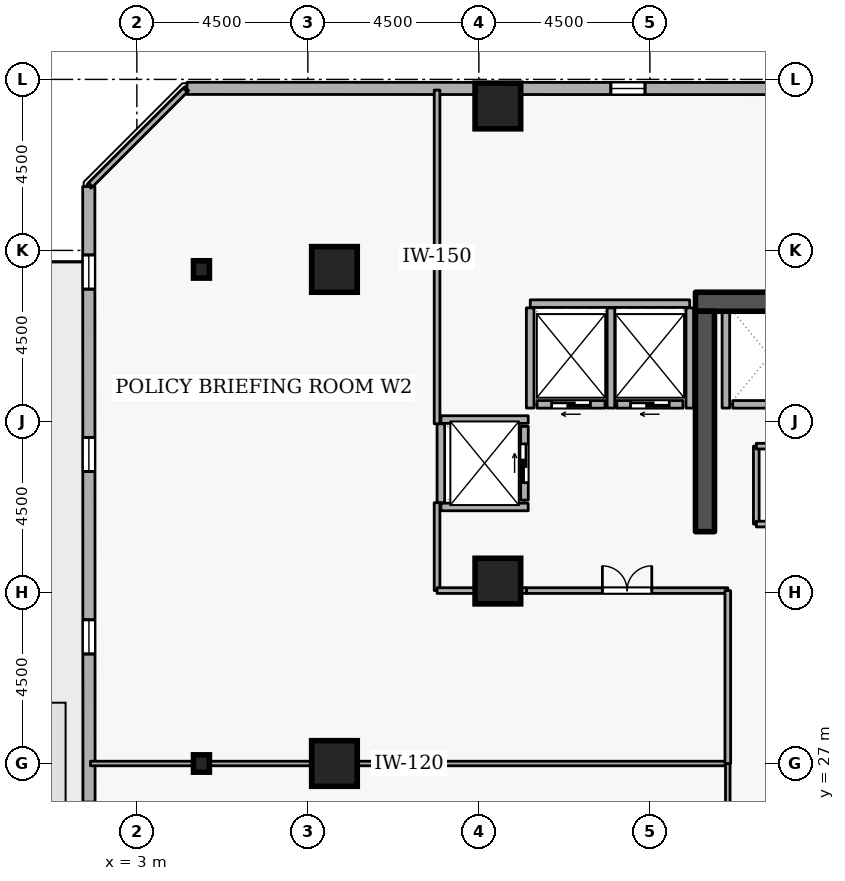
"""IFC4 building model, lengths in metres.
Left out: names, types, materials, properties, quantities, classifications, styles, units other than length and angle.
Written with IfcOpenShell. Run it as: python <this file> out.ifc"""

import sys

from ifc_helpers import new_model, si_unit, direction, frame, frame_2d, origin, origin_2d, place, context, subcontext, project, spatial, rectangle, i_section, extrude, element, fill, save


model = new_model("IFC4")
c1 = context("Model", 3, precision=1e-05, world=origin(), true_north=direction((0.0, 1.0)))
c2 = subcontext(c1, "Body", "Model", "MODEL_VIEW")
j1 = project(units=[si_unit("LENGTHUNIT", "METRE"), si_unit("PLANEANGLEUNIT", "RADIAN")], contexts=[c1])
p1 = place(None, origin())
s1 = spatial("IfcSite", under=j1, at=p1, CompositionType="ELEMENT")
p2 = place(p1, origin())
s2 = spatial("IfcBuilding", under=s1, at=p2, CompositionType="ELEMENT")
p3 = place(p2, frame((0.0, 0.0, 123.3)))
s3 = spatial("IfcBuildingStorey", under=s2, at=p3, CompositionType="ELEMENT", Elevation=123.3)
p4 = place(p3, frame((17.7, 39.15, 0.0), z_axis=(0.0, 0.0, 1.0), x_axis=(1.0, 0.0, 0.0)))
e1 = element("IfcWall", 1, at=p4, inside=s3, PredefinedType="SHEAR", context=c2, shape_type="SweptSolid", body=[
    extrude(rectangle(XDim=15.6, YDim=0.5, at=frame_2d((7.8, 0.0))), origin(), (0.0, 0.0, 1.0), 3.6),
])
p5 = place(p3, frame((17.95, 33.1, 0.0), z_axis=(0.0, 0.0, 1.0), x_axis=(0.0, 1.0, 0.0)))
e2 = element("IfcWall", 2, at=p5, inside=s3, PredefinedType="SHEAR", context=c2, shape_type="SweptSolid", body=[
    extrude(rectangle(XDim=5.8, YDim=0.5, at=frame_2d((2.9, 0.0))), origin(), (0.0, 0.0, 1.0), 3.6),
])
for number, where, z_axis, x_axis in (
    (3, (12.5, 44.3, 0.0), (0.0, 0.0, 1.0), (1.0, 0.0, 0.0)),
    (4, (8.2, 27.0, 0.0), (0.0, 0.0, 1.0), (1.0, 0.0, 0.0)),
    (5, (8.2, 40.0, 0.0), (0.0, 0.0, 1.0), (1.0, 0.0, 0.0)),
    (6, (12.5, 31.8, 0.0), (0.0, 0.0, 1.0), (1.0, 0.0, 0.0)),
):
    element("IfcColumn", number, at=place(p3, frame(where, z_axis=z_axis, x_axis=x_axis)), inside=s3, PredefinedType="COLUMN", context=c2, shape_type="SweptSolid", body=[
        extrude(rectangle(XDim=1.2, YDim=1.2, at=origin_2d()), origin(), (0.0, 0.0, 1.0), 3.6),
    ])
for number, where, z_axis, x_axis in (
    (7, (4.7, 27.0, 0.0), (0.0, 0.0, 1.0), (1.0, 0.0, 0.0)),
    (8, (4.7, 40.0, 0.0), (0.0, 0.0, 1.0), (1.0, 0.0, 0.0)),
):
    element("IfcColumn", number, at=place(p3, frame(where, z_axis=z_axis, x_axis=x_axis)), inside=s3, PredefinedType="COLUMN", context=c2, shape_type="SweptSolid", body=[
        extrude(i_section(OverallWidth=0.418, OverallDepth=0.456, WebThickness=0.042, FlangeThickness=0.067, FilletRadius=0.015, at=origin_2d()), origin(), (0.0, 0.0, 1.0), 3.6),
    ])
p6 = place(p3, frame((37.372, 44.754, 0.0), z_axis=(0.0, 0.0, 1.0), x_axis=(-0.999999944762, 0.000332378036, 0.0)))
e9 = element("IfcWall", 9, at=p6, inside=s3, PredefinedType="STANDARD", context=c2, shape_type="SweptSolid", body=[
    extrude(rectangle(XDim=33.054, YDim=0.32, at=frame_2d((16.527, 0.0))), origin(), (0.0, 0.0, 1.0), 2.7),
])
p7 = place(p6, frame((1.8, 0.0, 0.72)))
e10 = element("IfcOpeningElement", 10, at=p7, cuts=e9, PredefinedType="OPENING", context=c2, shape_type="SweptSolid", body=[
    extrude(rectangle(XDim=0.9, YDim=1.75, at=frame_2d((0.45, 0.875))), frame((0.0, 0.17, 0.0), z_axis=(0.0, -1.0, 0.0), x_axis=(1.0, 0.0, 0.0)), (0.0, 0.0, 1.0), 0.34),
])
p8 = place(p6, frame((6.6, 0.0, 0.72)))
e11 = element("IfcOpeningElement", 11, at=p8, cuts=e9, PredefinedType="OPENING", context=c2, shape_type="SweptSolid", body=[
    extrude(rectangle(XDim=0.9, YDim=1.75, at=frame_2d((0.45, 0.875))), frame((0.0, 0.17, 0.0), z_axis=(0.0, -1.0, 0.0), x_axis=(1.0, 0.0, 0.0)), (0.0, 0.0, 1.0), 0.34),
])
p9 = place(p6, frame((16.2, 0.0, 0.72)))
e12 = element("IfcOpeningElement", 12, at=p9, cuts=e9, PredefinedType="OPENING", context=c2, shape_type="SweptSolid", body=[
    extrude(rectangle(XDim=0.9, YDim=1.75, at=frame_2d((0.45, 0.875))), frame((0.0, 0.17, 0.0), z_axis=(0.0, -1.0, 0.0), x_axis=(1.0, 0.0, 0.0)), (0.0, 0.0, 1.0), 0.34),
])
p10 = place(p6, frame((21.0, 0.0, 0.72)))
e13 = element("IfcOpeningElement", 13, at=p10, cuts=e9, PredefinedType="OPENING", context=c2, shape_type="SweptSolid", body=[
    extrude(rectangle(XDim=0.9, YDim=1.75, at=frame_2d((0.45, 0.875))), frame((0.0, 0.17, 0.0), z_axis=(0.0, -1.0, 0.0), x_axis=(1.0, 0.0, 0.0)), (0.0, 0.0, 1.0), 0.34),
])
p11 = place(p3, frame((1.735, 42.181, 0.0), z_axis=(0.0, 0.0, 1.0), x_axis=(0.000332378036, -0.999999944762, 0.0)))
e14 = element("IfcWall", 14, at=p11, inside=s3, PredefinedType="STANDARD", context=c2, shape_type="SweptSolid", body=[
    extrude(rectangle(XDim=33.054, YDim=0.32, at=frame_2d((16.527, 0.0))), origin(), (0.0, 0.0, 1.0), 2.7),
])
p12 = place(p11, frame((18.327, 0.0, 0.0)))
e15 = element("IfcOpeningElement", 15, at=p12, cuts=e14, PredefinedType="OPENING", context=c2, shape_type="SweptSolid", body=[
    extrude(rectangle(XDim=1.0, YDim=2.08, at=frame_2d((0.5, 1.04))), frame((0.0, 0.17, 0.0), z_axis=(0.0, -1.0, 0.0), x_axis=(1.0, 0.0, 0.0)), (0.0, 0.0, 1.0), 0.34),
])
p13 = place(p11, frame((1.8, 0.0, 0.72)))
e16 = element("IfcOpeningElement", 16, at=p13, cuts=e14, PredefinedType="OPENING", context=c2, shape_type="SweptSolid", body=[
    extrude(rectangle(XDim=0.9, YDim=1.75, at=frame_2d((0.45, 0.875))), frame((0.0, 0.17, 0.0), z_axis=(0.0, -1.0, 0.0), x_axis=(1.0, 0.0, 0.0)), (0.0, 0.0, 1.0), 0.34),
])
p14 = place(p11, frame((6.6, 0.0, 0.72)))
e17 = element("IfcOpeningElement", 17, at=p14, cuts=e14, PredefinedType="OPENING", context=c2, shape_type="SweptSolid", body=[
    extrude(rectangle(XDim=0.9, YDim=1.75, at=frame_2d((0.45, 0.875))), frame((0.0, 0.17, 0.0), z_axis=(0.0, -1.0, 0.0), x_axis=(1.0, 0.0, 0.0)), (0.0, 0.0, 1.0), 0.34),
])
p15 = place(p11, frame((11.4, 0.0, 0.72)))
e18 = element("IfcOpeningElement", 18, at=p15, cuts=e14, PredefinedType="OPENING", context=c2, shape_type="SweptSolid", body=[
    extrude(rectangle(XDim=0.9, YDim=1.75, at=frame_2d((0.45, 0.875))), frame((0.0, 0.17, 0.0), z_axis=(0.0, -1.0, 0.0), x_axis=(1.0, 0.0, 0.0)), (0.0, 0.0, 1.0), 0.34),
])
p16 = place(p11, frame((16.2, 0.0, 0.72)))
e19 = element("IfcOpeningElement", 19, at=p16, cuts=e14, PredefinedType="OPENING", context=c2, shape_type="SweptSolid", body=[
    extrude(rectangle(XDim=0.9, YDim=1.75, at=frame_2d((0.45, 0.875))), frame((0.0, 0.17, 0.0), z_axis=(0.0, -1.0, 0.0), x_axis=(1.0, 0.0, 0.0)), (0.0, 0.0, 1.0), 0.34),
])
p17 = place(p11, frame((21.0, 0.0, 0.72)))
e20 = element("IfcOpeningElement", 20, at=p17, cuts=e14, PredefinedType="OPENING", context=c2, shape_type="SweptSolid", body=[
    extrude(rectangle(XDim=0.9, YDim=1.75, at=frame_2d((0.45, 0.875))), frame((0.0, 0.17, 0.0), z_axis=(0.0, -1.0, 0.0), x_axis=(1.0, 0.0, 0.0)), (0.0, 0.0, 1.0), 0.34),
])
p18 = place(p11, frame((25.8, 0.0, 0.72)))
e21 = element("IfcOpeningElement", 21, at=p18, cuts=e14, PredefinedType="OPENING", context=c2, shape_type="SweptSolid", body=[
    extrude(rectangle(XDim=0.9, YDim=1.75, at=frame_2d((0.45, 0.875))), frame((0.0, 0.17, 0.0), z_axis=(0.0, -1.0, 0.0), x_axis=(1.0, 0.0, 0.0)), (0.0, 0.0, 1.0), 0.34),
])
p19 = place(p3, frame((20.62, 36.45, 0.0), z_axis=(0.0, 0.0, 1.0), x_axis=(-1.0, 0.0, 0.0)))
e22 = element("IfcWall", 22, at=p19, inside=s3, PredefinedType="STANDARD", context=c2, shape_type="SweptSolid", body=[
    extrude(rectangle(XDim=1.94, YDim=0.2, at=frame_2d((0.97, 0.0))), origin(), (0.0, 0.0, 1.0), 3.34),
])
p20 = place(p3, frame((17.37, 36.45, 0.0), z_axis=(0.0, 0.0, 1.0), x_axis=(-1.0, 0.0, 0.0)))
e23 = element("IfcWall", 23, at=p20, inside=s3, PredefinedType="STANDARD", context=c2, shape_type="SweptSolid", body=[
    extrude(rectangle(XDim=1.74, YDim=0.2, at=frame_2d((0.87, 0.0))), origin(), (0.0, 0.0, 1.0), 3.34),
])
p21 = place(p20, frame((0.36, 0.0, 0.0)))
e24 = element("IfcOpeningElement", 24, at=p21, cuts=e23, PredefinedType="OPENING", context=c2, shape_type="SweptSolid", body=[
    extrude(rectangle(XDim=1.02, YDim=2.06, at=frame_2d((0.51, 1.03))), frame((0.0, 0.11, 0.0), z_axis=(0.0, -1.0, 0.0), x_axis=(1.0, 0.0, 0.0)), (0.0, 0.0, 1.0), 0.22),
])
p22 = place(p3, frame((15.32, 36.45, 0.0), z_axis=(0.0, 0.0, 1.0), x_axis=(-1.0, 0.0, 0.0)))
e25 = element("IfcWall", 25, at=p22, inside=s3, PredefinedType="STANDARD", context=c2, shape_type="SweptSolid", body=[
    extrude(rectangle(XDim=1.79, YDim=0.2, at=frame_2d((0.895, 0.0))), origin(), (0.0, 0.0, 1.0), 3.34),
])
p23 = place(p22, frame((0.385, 0.0, 0.0)))
e26 = element("IfcOpeningElement", 26, at=p23, cuts=e25, PredefinedType="OPENING", context=c2, shape_type="SweptSolid", body=[
    extrude(rectangle(XDim=1.02, YDim=2.06, at=frame_2d((0.51, 1.03))), frame((0.0, 0.11, 0.0), z_axis=(0.0, -1.0, 0.0), x_axis=(1.0, 0.0, 0.0)), (0.0, 0.0, 1.0), 0.22),
])
p24 = place(p3, frame((13.2, 33.93, 0.0), z_axis=(0.0, 0.0, 1.0), x_axis=(0.0, 1.0, 0.0)))
e27 = element("IfcWall", 27, at=p24, inside=s3, PredefinedType="STANDARD", context=c2, shape_type="SweptSolid", body=[
    extrude(rectangle(XDim=1.94, YDim=0.2, at=frame_2d((0.97, 0.0))), origin(), (0.0, 0.0, 1.0), 3.34),
])
p25 = place(p24, frame((0.46, 0.0, 0.0)))
e28 = element("IfcOpeningElement", 28, at=p25, cuts=e27, PredefinedType="OPENING", context=c2, shape_type="SweptSolid", body=[
    extrude(rectangle(XDim=1.02, YDim=2.06, at=frame_2d((0.51, 1.03))), frame((0.0, 0.11, 0.0), z_axis=(0.0, -1.0, 0.0), x_axis=(1.0, 0.0, 0.0)), (0.0, 0.0, 1.0), 0.22),
])
p26 = place(p3, frame((18.5, 36.352, 0.0), z_axis=(0.0, 0.0, 1.0), x_axis=(0.0, 1.0, 0.0)))
e29 = element("IfcWall", 29, at=p26, inside=s3, PredefinedType="STANDARD", context=c2, shape_type="SweptSolid", body=[
    extrude(rectangle(XDim=2.536, YDim=0.2, at=frame_2d((1.268, 0.0))), origin(), (0.0, 0.0, 1.0), 3.34),
])
p27 = place(p3, frame((13.352, 39.1, 0.0), z_axis=(0.0, 0.0, 1.0), x_axis=(1.0, 0.0, 0.0)))
e30 = element("IfcWall", 30, at=p27, inside=s3, PredefinedType="STANDARD", context=c2, shape_type="SweptSolid", body=[
    extrude(rectangle(XDim=4.196, YDim=0.2, at=frame_2d((2.098, 0.0))), origin(), (0.0, 0.0, 1.0), 3.34),
])
p28 = place(p3, frame((17.55, 36.352, 0.0), z_axis=(0.0, 0.0, 1.0), x_axis=(0.0, 1.0, 0.0)))
e31 = element("IfcWall", 31, at=p28, inside=s3, PredefinedType="STANDARD", context=c2, shape_type="SweptSolid", body=[
    extrude(rectangle(XDim=2.636, YDim=0.2, at=frame_2d((1.318, 0.0))), origin(), (0.0, 0.0, 1.0), 2.545),
])
for number, where, z_axis, x_axis in (
    (32, (15.475, 36.352, 0.0), (0.0, 0.0, 1.0), (0.0, 1.0, 0.0)),
    (33, (13.35, 36.352, 0.0), (0.0, 0.0, 1.0), (0.0, 1.0, 0.0)),
):
    element("IfcWall", number, at=place(p3, frame(where, z_axis=z_axis, x_axis=x_axis)), inside=s3, PredefinedType="STANDARD", context=c2, shape_type="SweptSolid", body=[
        extrude(rectangle(XDim=2.636, YDim=0.2, at=frame_2d((1.318, 0.0))), origin(), (0.0, 0.0, 1.0), 3.34),
    ])
for number, where, z_axis, x_axis in (
    (34, (11.002, 36.05, 0.0), (0.0, 0.0, 1.0), (1.0, 0.0, 0.0)),
    (35, (11.002, 33.75, 0.0), (0.0, 0.0, 1.0), (1.0, 0.0, 0.0)),
):
    element("IfcWall", number, at=place(p3, frame(where, z_axis=z_axis, x_axis=x_axis)), inside=s3, PredefinedType="STANDARD", context=c2, shape_type="SweptSolid", body=[
        extrude(rectangle(XDim=2.296, YDim=0.2, at=frame_2d((1.148, 0.0))), origin(), (0.0, 0.0, 1.0), 3.34),
    ])
p29 = place(p3, frame((11.0, 33.862, 0.0), z_axis=(0.0, 0.0, 1.0), x_axis=(0.0, 1.0, 0.0)))
e36 = element("IfcWall", 36, at=p29, inside=s3, PredefinedType="STANDARD", context=c2, shape_type="SweptSolid", body=[
    extrude(rectangle(XDim=2.076, YDim=0.2, at=frame_2d((1.038, 0.0))), origin(), (0.0, 0.0, 1.0), 3.34),
])
p30 = place(p3, frame((19.3, 33.3, 0.0), z_axis=(0.0, 0.0, 1.0), x_axis=(0.0, 1.0, 0.0)))
e37 = element("IfcWall", 37, at=p30, inside=s3, PredefinedType="PARTITIONING", context=c2, shape_type="SweptSolid", body=[
    extrude(rectangle(XDim=2.05, YDim=0.15, at=frame_2d((1.025, 0.0))), origin(), (0.0, 0.0, 1.0), 3.34),
])
p31 = place(p3, frame((19.3, 35.35, 0.0), z_axis=(0.0, 0.0, 1.0), x_axis=(1.0, 0.0, 0.0)))
e38 = element("IfcWall", 38, at=p31, inside=s3, PredefinedType="PARTITIONING", context=c2, shape_type="SweptSolid", body=[
    extrude(rectangle(XDim=3.25, YDim=0.15, at=frame_2d((1.625, 0.0))), origin(), (0.0, 0.0, 1.0), 3.34),
])
p32 = place(p3, frame((22.55, 33.3, 0.0), z_axis=(0.0, 0.0, 1.0), x_axis=(-1.0, 0.0, 0.0)))
e39 = element("IfcWall", 39, at=p32, inside=s3, PredefinedType="PARTITIONING", context=c2, shape_type="SweptSolid", body=[
    extrude(rectangle(XDim=3.25, YDim=0.15, at=frame_2d((1.625, 0.0))), origin(), (0.0, 0.0, 1.0), 3.34),
])
p33 = place(p32, frame((1.165, 0.0, 0.0)))
e40 = element("IfcOpeningElement", 40, at=p33, cuts=e39, PredefinedType="OPENING", context=c2, shape_type="SweptSolid", body=[
    extrude(rectangle(XDim=0.92, YDim=2.08, at=frame_2d((0.46, 1.04))), frame((0.0, 0.085, 0.0), z_axis=(0.0, -1.0, 0.0), x_axis=(1.0, 0.0, 0.0)), (0.0, 0.0, 1.0), 0.17),
])
p34 = place(p3, frame((1.78, 27.0, 0.0), z_axis=(0.0, 0.0, 1.0), x_axis=(1.0, 0.0, 0.0)))
e41 = element("IfcWall", 41, at=p34, inside=s3, PredefinedType="PARTITIONING", context=c2, shape_type="SweptSolid", body=[
    extrude(rectangle(XDim=16.77, YDim=0.12, at=frame_2d((8.385, 0.0))), origin(), (0.0, 0.0, 1.0), 2.932),
])
p35 = place(p3, frame((18.55, 27.0, 0.0), z_axis=(0.0, 0.0, 1.0), x_axis=(0.0, -1.0, 0.0)))
e42 = element("IfcWall", 42, at=p35, inside=s3, PredefinedType="PARTITIONING", context=c2, shape_type="SweptSolid", body=[
    extrude(rectangle(XDim=4.55, YDim=0.12, at=frame_2d((2.275, 0.0))), origin(), (0.0, 0.0, 1.0), 3.34),
])
p36 = place(p3, frame((13.25, 31.55, 0.0), z_axis=(0.0, 0.0, 1.0), x_axis=(1.0, 0.0, 0.0)))
e43 = element("IfcWall", 43, at=p36, inside=s3, PredefinedType="PARTITIONING", context=c2, shape_type="SweptSolid", body=[
    extrude(rectangle(XDim=5.3, YDim=0.15, at=frame_2d((2.65, 0.0))), origin(), (0.0, 0.0, 1.0), 3.34),
])
p37 = place(p36, frame((2.0, 0.0, 0.0)))
e44 = element("IfcOpeningElement", 44, at=p37, cuts=e43, PredefinedType="OPENING", context=c2, shape_type="SweptSolid", body=[
    extrude(rectangle(XDim=1.3, YDim=2.12, at=frame_2d((0.65, 1.06))), frame((0.0, 0.085, 0.0), z_axis=(0.0, -1.0, 0.0), x_axis=(1.0, 0.0, 0.0)), (0.0, 0.0, 1.0), 0.17),
])
p38 = place(p3, frame((18.55, 31.55, 0.0), z_axis=(0.0, 0.0, 1.0), x_axis=(0.0, -1.0, 0.0)))
e45 = element("IfcWall", 45, at=p38, inside=s3, PredefinedType="PARTITIONING", context=c2, shape_type="SweptSolid", body=[
    extrude(rectangle(XDim=4.55, YDim=0.15, at=frame_2d((2.275, 0.0))), origin(), (0.0, 0.0, 1.0), 3.34),
])
p39 = place(p3, frame((1.78, 42.225, 0.0), z_axis=(0.0, 0.0, 1.0), x_axis=(0.707106781187, 0.707106781187, 0.0)))
e46 = element("IfcWall", 46, at=p39, inside=s3, PredefinedType="PARTITIONING", context=c2, shape_type="SweptSolid", body=[
    extrude(rectangle(XDim=3.528, YDim=0.15, at=frame_2d((1.764, 0.0))), origin(), (0.0, 0.0, 1.0), 3.34),
])
p40 = place(p3, frame((10.9, 44.72, 0.0), z_axis=(0.0, 0.0, 1.0), x_axis=(0.0, -1.0, 0.0)))
e47 = element("IfcWall", 47, at=p40, inside=s3, PredefinedType="PARTITIONING", context=c2, shape_type="SweptSolid", body=[
    extrude(rectangle(XDim=8.782, YDim=0.15, at=frame_2d((4.391, 0.0))), origin(), (0.0, 0.0, 1.0), 3.34),
])
p41 = place(p3, frame((10.9, 33.862, 0.0), z_axis=(0.0, 0.0, 1.0), x_axis=(0.0, -1.0, 0.0)))
e48 = element("IfcWall", 48, at=p41, inside=s3, PredefinedType="PARTITIONING", context=c2, shape_type="SweptSolid", body=[
    extrude(rectangle(XDim=2.312, YDim=0.15, at=frame_2d((1.156, 0.0))), origin(), (0.0, 0.0, 1.0), 3.34),
])
p42 = place(p3, frame((10.9, 31.55, 0.0), z_axis=(0.0, 0.0, 1.0), x_axis=(1.0, 0.0, 0.0)))
e49 = element("IfcWall", 49, at=p42, inside=s3, PredefinedType="PARTITIONING", context=c2, shape_type="SweptSolid", body=[
    extrude(rectangle(XDim=2.35, YDim=0.15, at=frame_2d((1.175, 0.0))), origin(), (0.0, 0.0, 1.0), 3.34),
])
p43 = place(p10, origin())
e50 = element("IfcWindow", 50, at=p43, inside=s3, PartitioningType="SINGLE_PANEL", PredefinedType="WINDOW", context=c2, shape_type="SweptSolid", body=[
    extrude(rectangle(XDim=0.9, YDim=1.75, at=frame_2d((0.45, 0.875))), frame((0.0, 0.03, 0.0), z_axis=(0.0, -1.0, 0.0), x_axis=(1.0, 0.0, 0.0)), (0.0, 0.0, 1.0), 0.06),
])
fill(e13, e50)
p44 = place(p13, origin())
e51 = element("IfcWindow", 51, at=p44, inside=s3, PartitioningType="SINGLE_PANEL", PredefinedType="WINDOW", context=c2, shape_type="SweptSolid", body=[
    extrude(rectangle(XDim=0.9, YDim=1.75, at=frame_2d((0.45, 0.875))), frame((0.0, 0.03, 0.0), z_axis=(0.0, -1.0, 0.0), x_axis=(1.0, 0.0, 0.0)), (0.0, 0.0, 1.0), 0.06),
])
fill(e16, e51)
p45 = place(p14, origin())
e52 = element("IfcWindow", 52, at=p45, inside=s3, PartitioningType="SINGLE_PANEL", PredefinedType="WINDOW", context=c2, shape_type="SweptSolid", body=[
    extrude(rectangle(XDim=0.9, YDim=1.75, at=frame_2d((0.45, 0.875))), frame((0.0, 0.03, 0.0), z_axis=(0.0, -1.0, 0.0), x_axis=(1.0, 0.0, 0.0)), (0.0, 0.0, 1.0), 0.06),
])
fill(e17, e52)
p46 = place(p15, origin())
e53 = element("IfcWindow", 53, at=p46, inside=s3, PartitioningType="SINGLE_PANEL", PredefinedType="WINDOW", context=c2, shape_type="SweptSolid", body=[
    extrude(rectangle(XDim=0.9, YDim=1.75, at=frame_2d((0.45, 0.875))), frame((0.0, 0.03, 0.0), z_axis=(0.0, -1.0, 0.0), x_axis=(1.0, 0.0, 0.0)), (0.0, 0.0, 1.0), 0.06),
])
fill(e18, e53)
p47 = place(p21, origin())
e54 = element("IfcDoor", 54, at=p47, inside=s3, OperationType="SLIDING_TO_LEFT", PredefinedType="DOOR", context=c2, shape_type="SweptSolid", body=[
    extrude(rectangle(XDim=1.02, YDim=2.06, at=frame_2d((0.51, 1.03))), frame((0.0, 0.025, 0.0), z_axis=(0.0, -1.0, 0.0), x_axis=(1.0, 0.0, 0.0)), (0.0, 0.0, 1.0), 0.05),
])
fill(e24, e54)
p48 = place(p23, origin())
e55 = element("IfcDoor", 55, at=p48, inside=s3, OperationType="SLIDING_TO_LEFT", PredefinedType="DOOR", context=c2, shape_type="SweptSolid", body=[
    extrude(rectangle(XDim=1.02, YDim=2.06, at=frame_2d((0.51, 1.03))), frame((0.0, 0.025, 0.0), z_axis=(0.0, -1.0, 0.0), x_axis=(1.0, 0.0, 0.0)), (0.0, 0.0, 1.0), 0.05),
])
fill(e26, e55)
p49 = place(p25, origin())
e56 = element("IfcDoor", 56, at=p49, inside=s3, OperationType="SLIDING_TO_LEFT", PredefinedType="DOOR", context=c2, shape_type="SweptSolid", body=[
    extrude(rectangle(XDim=1.02, YDim=2.06, at=frame_2d((0.51, 1.03))), frame((0.0, 0.025, 0.0), z_axis=(0.0, -1.0, 0.0), x_axis=(1.0, 0.0, 0.0)), (0.0, 0.0, 1.0), 0.05),
])
fill(e28, e56)
p50 = place(p37, origin())
e57 = element("IfcDoor", 57, at=p50, inside=s3, OperationType="DOUBLE_DOOR_SINGLE_SWING", PredefinedType="DOOR", context=c2, shape_type="SweptSolid", body=[
    extrude(rectangle(XDim=1.3, YDim=2.12, at=frame_2d((0.65, 1.06))), frame((0.0, 0.025, 0.0), z_axis=(0.0, -1.0, 0.0), x_axis=(1.0, 0.0, 0.0)), (0.0, 0.0, 1.0), 0.05),
])
fill(e44, e57)
save(model, sys.argv[1])
